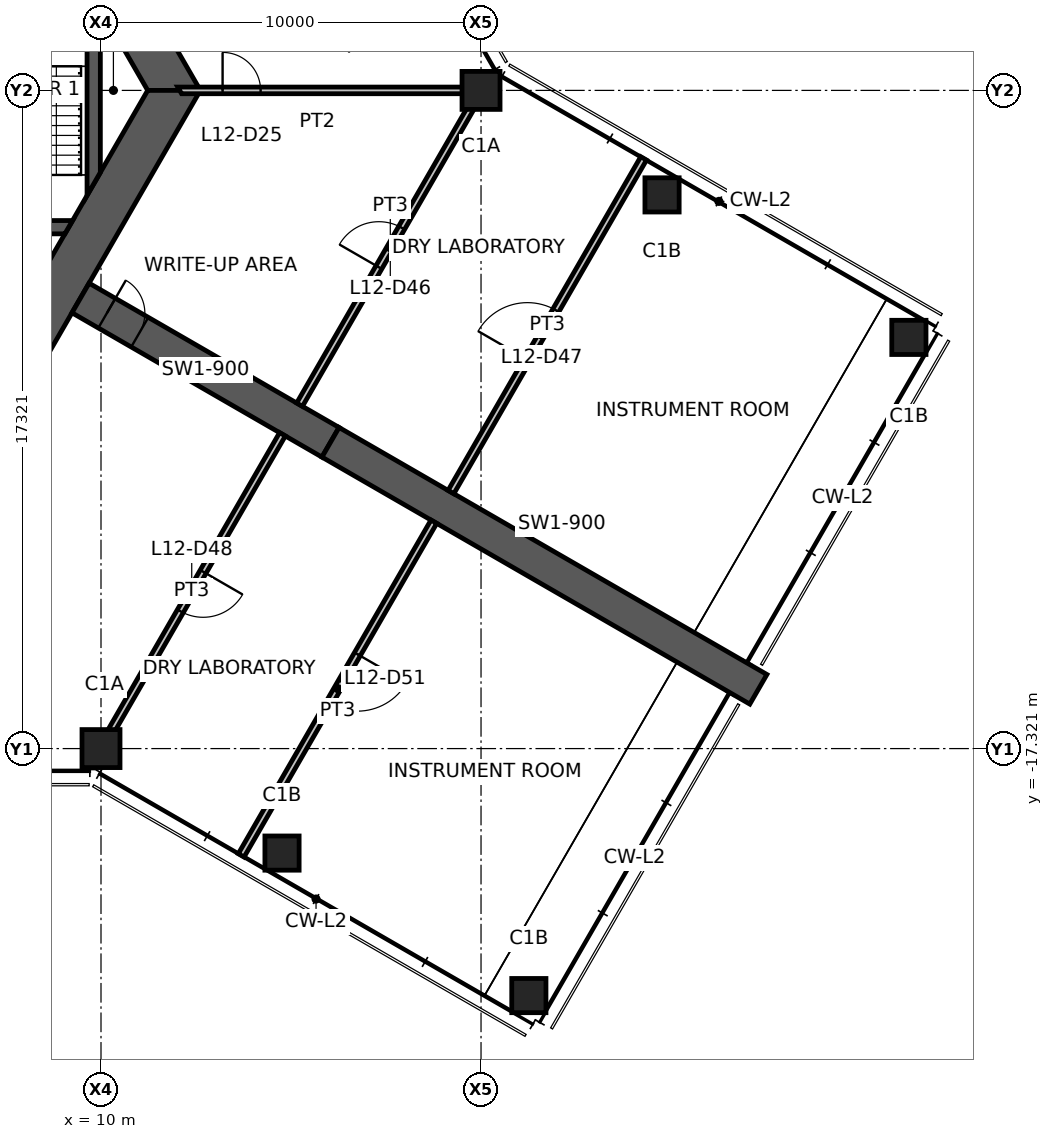
"""IFC4 building model, lengths in metres.
Left out: names, types, materials, properties, quantities, classifications, styles, units other than length and angle.
Written with IfcOpenShell. Run it as: python <this file> out.ifc"""

import sys

from ifc_helpers import new_model, si_unit, direction, frame, frame_2d, origin, origin_2d, place, context, subcontext, project, spatial, polyline, rectangle, hollow_rectangle, outline, extrude, element, fill, save


model = new_model("IFC4")
c1 = context("Model", 3, precision=1e-05, world=origin(), true_north=direction((0.0, 1.0)))
c2 = subcontext(c1, "Body", "Model", "MODEL_VIEW")
j1 = project(units=[si_unit("LENGTHUNIT", "METRE"), si_unit("PLANEANGLEUNIT", "RADIAN")], contexts=[c1])
p1 = place(None, origin())
s1 = spatial("IfcSite", under=j1, at=p1, CompositionType="ELEMENT")
p2 = place(p1, origin())
s2 = spatial("IfcBuilding", under=s1, at=p2, CompositionType="ELEMENT")
p3 = place(p2, frame((0.0, 0.0, 47.8)))
s3 = spatial("IfcBuildingStorey", under=s2, at=p3, CompositionType="ELEMENT", Elevation=47.8)
for number, where, z_axis, x_axis in (
    (1, (20.0, 0.0, 0.0), (0.0, 0.0, 1.0), (1.0, 0.0, 0.0)),
    (2, (10.0, -17.321, 0.0), (0.0, 0.0, 1.0), (1.0, 0.0, 0.0)),
):
    element("IfcColumn", number, at=place(p3, frame(where, z_axis=z_axis, x_axis=x_axis)), inside=s3, PredefinedType="COLUMN", context=c2, shape_type="SweptSolid", body=[
        extrude(hollow_rectangle(XDim=1.0, YDim=1.0, WallThickness=0.06, at=origin_2d()), origin(), (0.0, 0.0, 1.0), 4.2),
    ])
for number, where, z_axis, x_axis in (
    (3, (14.763, -20.071, 0.0), (0.0, 0.0, 1.0), (1.0, 0.0, 0.0)),
    (4, (21.258, -23.821, 0.0), (0.0, 0.0, 1.0), (1.0, 0.0, 0.0)),
    (5, (24.763, -2.75, 0.0), (0.0, 0.0, 1.0), (1.0, 0.0, 0.0)),
    (6, (31.258, -6.5, 0.0), (0.0, 0.0, 1.0), (1.0, 0.0, 0.0)),
):
    element("IfcColumn", number, at=place(p3, frame(where, z_axis=z_axis, x_axis=x_axis)), inside=s3, PredefinedType="COLUMN", context=c2, shape_type="SweptSolid", body=[
        extrude(hollow_rectangle(XDim=0.9, YDim=0.9, WallThickness=0.05, at=origin_2d()), origin(), (0.0, 0.0, 1.0), 4.2),
    ])
p4 = place(p3, frame((11.922, 0.0, 0.0), z_axis=(0.0, 0.0, 1.0), x_axis=(-0.500004296715, 0.866022923061, 0.0)))
e7 = element("IfcWall", 7, at=p4, inside=s3, PredefinedType="SHEAR", context=c2, shape_type="SweptSolid", body=[
    extrude(outline(polyline([(-0.346, -0.6), (5.835, -0.6), (6.635, -0.6), (12.269, -0.6), (11.576, 0.6), (6.635, 0.6), (5.835, 0.6), (0.346, 0.6), (-0.346, -0.6)])), origin(), (0.0, 0.0, 1.0), 4.2),
])
p5 = place(p4, frame((5.835, 0.0, 0.0)))
e8 = element("IfcOpeningElement", 8, at=p5, cuts=e7, PredefinedType="OPENING", context=c2, shape_type="SweptSolid", body=[
    extrude(rectangle(XDim=0.8, YDim=2.1, at=frame_2d((0.4, 1.05))), frame((0.0, 0.61, 0.0), z_axis=(0.0, -1.0, 0.0), x_axis=(1.0, 0.0, 0.0)), (0.0, 0.0, 1.0), 1.22),
])
p6 = place(p3, frame((5.961, -10.325, 0.0), z_axis=(0.0, 0.0, 1.0), x_axis=(0.500004296715, 0.866022923061, 0.0)))
e9 = element("IfcWall", 9, at=p6, inside=s3, PredefinedType="SHEAR", context=c2, shape_type="SweptSolid", body=[
    extrude(outline(polyline([(-0.346, -0.6), (3.208, -0.6), (4.009, -0.6), (12.269, -0.6), (11.576, 0.6), (4.009, 0.6), (3.208, 0.6), (0.346, 0.6), (-0.346, -0.6)])), origin(), (0.0, 0.0, 1.0), 4.2),
])
p7 = place(p6, frame((3.208, 0.0, 0.0)))
e10 = element("IfcOpeningElement", 10, at=p7, cuts=e9, PredefinedType="OPENING", context=c2, shape_type="SweptSolid", body=[
    extrude(rectangle(XDim=0.8, YDim=2.1, at=frame_2d((0.4, 1.05))), frame((0.0, 0.61, 0.0), z_axis=(0.0, -1.0, 0.0), x_axis=(1.0, 0.0, 0.0)), (0.0, 0.0, 1.0), 1.22),
])
p8 = place(p3, frame((9.461, -5.462, 0.0), z_axis=(0.0, 0.0, 1.0), x_axis=(0.866019116917, -0.500010889016, 0.0)))
e11 = element("IfcWall", 11, at=p8, inside=s3, PredefinedType="SHEAR", context=c2, shape_type="SweptSolid", body=[
    extrude(rectangle(XDim=7.595, YDim=0.9, at=frame_2d((3.798, 0.0))), origin(), (0.0, 0.0, 1.0), 4.2),
])
p9 = place(p8, frame((0.8, 0.0, 0.0)))
e12 = element("IfcOpeningElement", 12, at=p9, cuts=e11, PredefinedType="OPENING", context=c2, shape_type="SweptSolid", body=[
    extrude(rectangle(XDim=1.0, YDim=2.1, at=frame_2d((0.5, 1.05))), frame((0.0, 0.46, 0.0), z_axis=(0.0, -1.0, 0.0), x_axis=(1.0, 0.0, 0.0)), (0.0, 0.0, 1.0), 0.92),
])
p10 = place(p3, frame((16.039, -9.26, 0.0), z_axis=(0.0, 0.0, 1.0), x_axis=(0.866024837091, -0.50000098154, 0.0)))
e13 = element("IfcWall", 13, at=p10, inside=s3, PredefinedType="SHEAR", context=c2, shape_type="SweptSolid", body=[
    extrude(rectangle(XDim=13.0, YDim=0.9, at=frame_2d((6.5, 0.0))), origin(), (0.0, 0.0, 1.0), 4.2),
])
p11 = place(p3, frame((1.425, -3.6, 0.0), z_axis=(0.0, 0.0, 1.0), x_axis=(1.0, 0.0, 0.0)))
e14 = element("IfcWall", 14, at=p11, inside=s3, PredefinedType="SHEAR", context=c2, shape_type="SweptSolid", body=[
    extrude(outline(polyline([(0.0, -0.175), (1.125, -0.175), (2.125, -0.175), (7.625, -0.175), (7.827, 0.175), (2.125, 0.175), (1.125, 0.175), (0.0, 0.175), (0.0, -0.175)])), origin(), (0.0, 0.0, 1.0), 4.2),
])
p12 = place(p11, frame((1.125, 0.0, 0.0)))
e15 = element("IfcOpeningElement", 15, at=p12, cuts=e14, PredefinedType="OPENING", context=c2, shape_type="SweptSolid", body=[
    extrude(rectangle(XDim=1.0, YDim=2.1, at=frame_2d((0.5, 1.05))), frame((0.0, 0.185, 0.0), z_axis=(0.0, -1.0, 0.0), x_axis=(1.0, 0.0, 0.0)), (0.0, 0.0, 1.0), 0.37),
])
p13 = place(p3, frame((9.808, -2.462, 0.0), z_axis=(0.0, 0.0, 1.0), x_axis=(0.0, 1.0, 0.0)))
e16 = element("IfcWall", 16, at=p13, inside=s3, PredefinedType="SHEAR", context=c2, shape_type="SweptSolid", body=[
    extrude(outline(polyline([(0.303, -0.175), (4.621, -0.175), (5.228, 0.175), (-0.303, 0.175), (0.303, -0.175)])), origin(), (0.0, 0.0, 1.0), 4.2),
])
p14 = place(p3, frame((12.07, 0.0, 0.0), z_axis=(0.0, 0.0, 1.0), x_axis=(1.0, 0.0, 0.0)))
e17 = element("IfcWall", 17, at=p14, inside=s3, PredefinedType="PARTITIONING", context=c2, shape_type="SweptSolid", body=[
    extrude(outline(polyline([(0.051, -0.087), (1.129, -0.087), (2.129, -0.087), (7.93, -0.087), (7.93, 0.087), (2.129, 0.087), (1.129, 0.087), (-0.051, 0.087), (0.051, -0.087)])), origin(), (0.0, 0.0, 1.0), 3.05),
])
p15 = place(p14, frame((1.129, 0.0, 0.0)))
e18 = element("IfcOpeningElement", 18, at=p15, cuts=e17, PredefinedType="OPENING", context=c2, shape_type="SweptSolid", body=[
    extrude(rectangle(XDim=1.0, YDim=2.1, at=frame_2d((0.5, 1.05))), frame((0.0, 0.098, 0.0), z_axis=(0.0, -1.0, 0.0), x_axis=(1.0, 0.0, 0.0)), (0.0, 0.0, 1.0), 0.195),
])
p16 = place(p3, frame((15.225, -8.271, 0.0), z_axis=(0.0, 0.0, 1.0), x_axis=(0.499993908199, 0.866028920859, 0.0)))
e19 = element("IfcWall", 19, at=p16, inside=s3, PredefinedType="PARTITIONING", context=c2, shape_type="SweptSolid", body=[
    extrude(rectangle(XDim=9.55, YDim=0.175, at=frame_2d((4.775, 0.0))), origin(), (0.0, 0.0, 1.0), 2.95),
])
p17 = place(p16, frame((4.175, 0.0, 0.0)))
e20 = element("IfcOpeningElement", 20, at=p17, cuts=e19, PredefinedType="OPENING", context=c2, shape_type="SweptSolid", body=[
    extrude(rectangle(XDim=1.2, YDim=2.1, at=frame_2d((0.6, 1.05))), frame((0.0, 0.098, 0.0), z_axis=(0.0, -1.0, 0.0), x_axis=(1.0, 0.0, 0.0)), (0.0, 0.0, 1.0), 0.195),
])
p18 = place(p3, frame((19.209, -10.571, 0.0), z_axis=(0.0, 0.0, 1.0), x_axis=(0.500005203629, 0.866022399447, 0.0)))
e21 = element("IfcWall", 21, at=p18, inside=s3, PredefinedType="PARTITIONING", context=c2, shape_type="SweptSolid", body=[
    extrude(rectangle(XDim=10.14, YDim=0.175, at=frame_2d((5.07, 0.0))), origin(), (0.0, 0.0, 1.0), 3.95),
])
p19 = place(p18, frame((4.025, 0.0, 0.0)))
e22 = element("IfcOpeningElement", 22, at=p19, cuts=e21, PredefinedType="OPENING", context=c2, shape_type="SweptSolid", body=[
    extrude(rectangle(XDim=1.5, YDim=2.1, at=frame_2d((0.75, 1.05))), frame((0.0, 0.098, 0.0), z_axis=(0.0, -1.0, 0.0), x_axis=(1.0, 0.0, 0.0)), (0.0, 0.0, 1.0), 0.195),
])
p20 = place(p3, frame((14.775, -9.05, 0.0), z_axis=(0.0, 0.0, 1.0), x_axis=(-0.499993908199, -0.866028920859, 0.0)))
e23 = element("IfcWall", 23, at=p20, inside=s3, PredefinedType="PARTITIONING", context=c2, shape_type="SweptSolid", body=[
    extrude(rectangle(XDim=9.55, YDim=0.175, at=frame_2d((4.775, 0.0))), origin(), (0.0, 0.0, 1.0), 2.95),
])
p21 = place(p20, frame((4.175, 0.0, 0.0)))
e24 = element("IfcOpeningElement", 24, at=p21, cuts=e23, PredefinedType="OPENING", context=c2, shape_type="SweptSolid", body=[
    extrude(rectangle(XDim=1.2, YDim=2.1, at=frame_2d((0.6, 1.05))), frame((0.0, 0.098, 0.0), z_axis=(0.0, -1.0, 0.0), x_axis=(1.0, 0.0, 0.0)), (0.0, 0.0, 1.0), 0.195),
])
p22 = place(p3, frame((18.759, -11.35, 0.0), z_axis=(0.0, 0.0, 1.0), x_axis=(-0.500005203629, -0.866022399447, 0.0)))
e25 = element("IfcWall", 25, at=p22, inside=s3, PredefinedType="PARTITIONING", context=c2, shape_type="SweptSolid", body=[
    extrude(rectangle(XDim=10.14, YDim=0.175, at=frame_2d((5.07, 0.0))), origin(), (0.0, 0.0, 1.0), 3.95),
])
p23 = place(p22, frame((4.025, 0.0, 0.0)))
e26 = element("IfcOpeningElement", 26, at=p23, cuts=e25, PredefinedType="OPENING", context=c2, shape_type="SweptSolid", body=[
    extrude(rectangle(XDim=1.5, YDim=2.1, at=frame_2d((0.75, 1.05))), frame((0.0, 0.098, 0.0), z_axis=(0.0, -1.0, 0.0), x_axis=(1.0, 0.0, 0.0)), (0.0, 0.0, 1.0), 0.195),
])
p24 = place(p9, origin())
e27 = element("IfcDoor", 27, at=p24, inside=s3, OperationType="SINGLE_SWING_LEFT", PredefinedType="DOOR", context=c2, shape_type="SweptSolid", body=[
    extrude(rectangle(XDim=1.0, YDim=2.1, at=frame_2d((0.5, 1.05))), frame((0.0, 0.025, 0.0), z_axis=(0.0, -1.0, 0.0), x_axis=(1.0, 0.0, 0.0)), (0.0, 0.0, 1.0), 0.05),
])
fill(e12, e27)
p25 = place(p15, origin())
e28 = element("IfcDoor", 28, at=p25, inside=s3, OperationType="SINGLE_SWING_LEFT", PredefinedType="DOOR", context=c2, shape_type="SweptSolid", body=[
    extrude(rectangle(XDim=1.0, YDim=2.1, at=frame_2d((0.5, 1.05))), frame((0.0, 0.025, 0.0), z_axis=(0.0, -1.0, 0.0), x_axis=(1.0, 0.0, 0.0)), (0.0, 0.0, 1.0), 0.05),
])
fill(e18, e28)
p26 = place(p17, origin())
e29 = element("IfcDoor", 29, at=p26, inside=s3, OperationType="DOUBLE_DOOR_SINGLE_SWING", PredefinedType="DOOR", context=c2, shape_type="SweptSolid", body=[
    extrude(rectangle(XDim=1.2, YDim=2.1, at=frame_2d((0.6, 1.05))), frame((0.0, 0.025, 0.0), z_axis=(0.0, -1.0, 0.0), x_axis=(1.0, 0.0, 0.0)), (0.0, 0.0, 1.0), 0.05),
])
fill(e20, e29)
p27 = place(p19, origin())
e30 = element("IfcDoor", 30, at=p27, inside=s3, OperationType="DOUBLE_DOOR_SINGLE_SWING", PredefinedType="DOOR", context=c2, shape_type="SweptSolid", body=[
    extrude(rectangle(XDim=1.5, YDim=2.1, at=frame_2d((0.75, 1.05))), frame((0.0, 0.025, 0.0), z_axis=(0.0, -1.0, 0.0), x_axis=(1.0, 0.0, 0.0)), (0.0, 0.0, 1.0), 0.05),
])
fill(e22, e30)
p28 = place(p21, origin())
e31 = element("IfcDoor", 31, at=p28, inside=s3, OperationType="DOUBLE_DOOR_SINGLE_SWING", PredefinedType="DOOR", context=c2, shape_type="SweptSolid", body=[
    extrude(rectangle(XDim=1.2, YDim=2.1, at=frame_2d((0.6, 1.05))), frame((0.0, 0.025, 0.0), z_axis=(0.0, -1.0, 0.0), x_axis=(1.0, 0.0, 0.0)), (0.0, 0.0, 1.0), 0.05),
])
fill(e24, e31)
p29 = place(p23, origin())
e32 = element("IfcDoor", 32, at=p29, inside=s3, OperationType="DOUBLE_DOOR_SINGLE_SWING", PredefinedType="DOOR", context=c2, shape_type="SweptSolid", body=[
    extrude(rectangle(XDim=1.5, YDim=2.1, at=frame_2d((0.75, 1.05))), frame((0.0, 0.025, 0.0), z_axis=(0.0, -1.0, 0.0), x_axis=(1.0, 0.0, 0.0)), (0.0, 0.0, 1.0), 0.05),
])
fill(e26, e32)
save(model, sys.argv[1])
